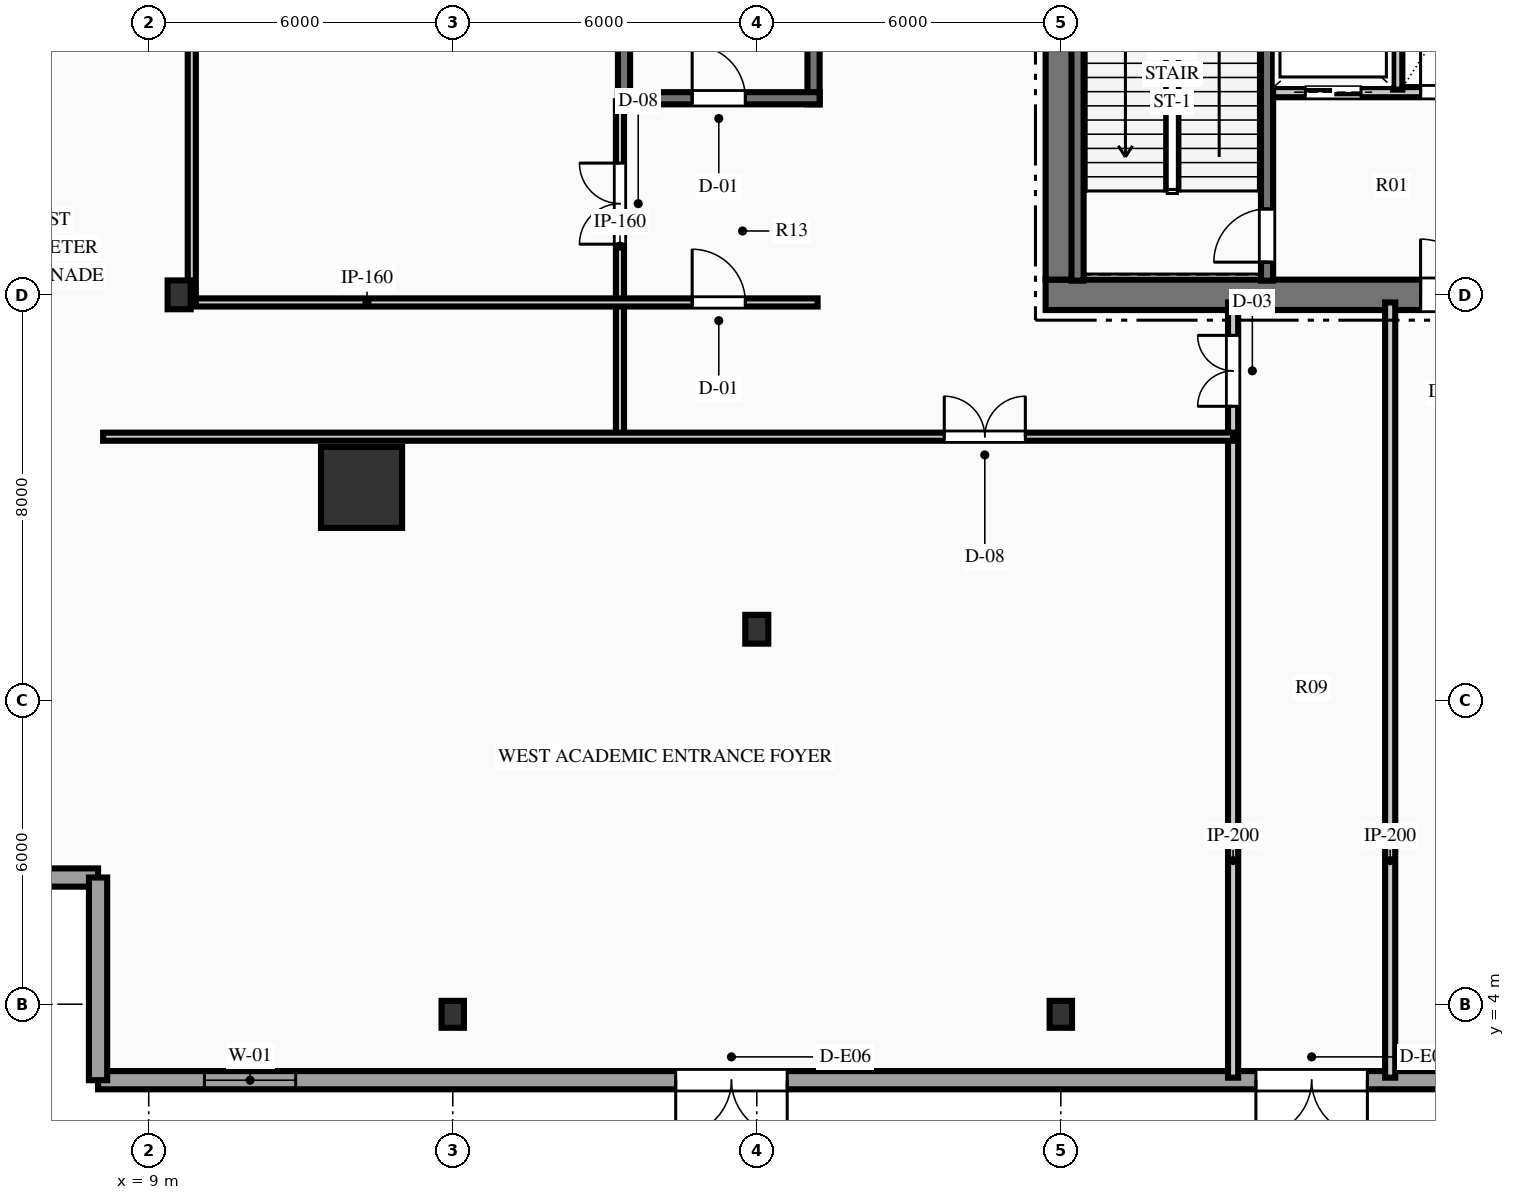
"""IFC4 building model, lengths in metres.
Left out: names, types, materials, properties, quantities, classifications, styles, units other than length and angle.
Written with IfcOpenShell. Run it as: python <this file> out.ifc"""

import sys

from ifc_helpers import new_model, si_unit, direction, frame, frame_2d, origin, origin_2d, place, context, subcontext, project, spatial, rectangle, hollow_rectangle, i_section, extrude, element, fill, save


model = new_model("IFC4")
c1 = context("Model", 3, precision=1e-05, world=origin(), true_north=direction((0.0, 1.0)))
c2 = subcontext(c1, "Body", "Model", "MODEL_VIEW")
j1 = project(units=[si_unit("LENGTHUNIT", "METRE"), si_unit("PLANEANGLEUNIT", "RADIAN")], contexts=[c1])
p1 = place(None, origin())
s1 = spatial("IfcSite", under=j1, at=p1, CompositionType="ELEMENT")
p2 = place(p1, origin())
s2 = spatial("IfcBuilding", under=s1, at=p2, CompositionType="ELEMENT")
p3 = place(p2, origin())
s3 = spatial("IfcBuildingStorey", under=s2, at=p3, CompositionType="ELEMENT", Elevation=0.0)
p4 = place(p3, frame((26.7, 18.0, 0.0), z_axis=(0.0, 0.0, 1.0), x_axis=(1.0, 0.0, 0.0)))
e1 = element("IfcWall", 1, at=p4, inside=s3, PredefinedType="SHEAR", context=c2, shape_type="SweptSolid", body=[
    extrude(rectangle(XDim=18.6, YDim=0.6, at=frame_2d((9.3, 0.0))), origin(), (0.0, 0.0, 1.0), 6.0),
])
p5 = place(p4, frame((7.4, 0.0, 0.0)))
e2 = element("IfcOpeningElement", 2, at=p5, cuts=e1, PredefinedType="OPENING", context=c2, shape_type="SweptSolid", body=[
    extrude(rectangle(XDim=1.1, YDim=2.15, at=frame_2d((0.55, 1.075))), frame((0.0, 0.31, 0.0), z_axis=(0.0, -1.0, 0.0), x_axis=(1.0, 0.0, 0.0)), (0.0, 0.0, 1.0), 0.62),
])
p6 = place(p4, frame((10.1, 0.0, 0.0)))
e3 = element("IfcOpeningElement", 3, at=p6, cuts=e1, PredefinedType="OPENING", context=c2, shape_type="SweptSolid", body=[
    extrude(rectangle(XDim=1.1, YDim=2.15, at=frame_2d((0.55, 1.075))), frame((0.0, 0.31, 0.0), z_axis=(0.0, -1.0, 0.0), x_axis=(1.0, 0.0, 0.0)), (0.0, 0.0, 1.0), 0.62),
])
p7 = place(p3, frame((27.0, 18.3, 0.0), z_axis=(0.0, 0.0, 1.0), x_axis=(0.0, 1.0, 0.0)))
e4 = element("IfcWall", 4, at=p7, inside=s3, PredefinedType="SHEAR", context=c2, shape_type="SweptSolid", body=[
    extrude(rectangle(XDim=15.4, YDim=0.6, at=frame_2d((7.7, 0.0))), origin(), (0.0, 0.0, 1.0), 6.0),
])
p8 = place(p7, frame((9.94, 0.0, 0.0)))
e5 = element("IfcOpeningElement", 5, at=p8, cuts=e4, PredefinedType="OPENING", context=c2, shape_type="SweptSolid", body=[
    extrude(rectangle(XDim=1.4, YDim=2.2, at=frame_2d((0.7, 1.1))), frame((0.0, 0.31, 0.0), z_axis=(0.0, -1.0, 0.0), x_axis=(1.0, 0.0, 0.0)), (0.0, 0.0, 1.0), 0.62),
])
p9 = place(p3, frame((31.07, 18.28, 0.0), z_axis=(0.0, 0.0, 1.0), x_axis=(0.0, 1.0, 0.0)))
e6 = element("IfcWall", 6, at=p9, inside=s3, PredefinedType="SHEAR", context=c2, shape_type="SweptSolid", body=[
    extrude(rectangle(XDim=8.26, YDim=0.24, at=frame_2d((4.13, 0.0))), origin(), (0.0, 0.0, 1.0), 6.0),
])
p10 = place(p9, frame((0.365, 0.0, 0.0)))
e7 = element("IfcOpeningElement", 7, at=p10, cuts=e6, PredefinedType="OPENING", context=c2, shape_type="SweptSolid", body=[
    extrude(rectangle(XDim=1.05, YDim=2.15, at=frame_2d((0.525, 1.075))), frame((0.0, 0.13, 0.0), z_axis=(0.0, -1.0, 0.0), x_axis=(1.0, 0.0, 0.0)), (0.0, 0.0, 1.0), 0.26),
])
p11 = place(p3, frame((27.33, 18.28, 0.0), z_axis=(0.0, 0.0, 1.0), x_axis=(0.0, 1.0, 0.0)))
e8 = element("IfcWall", 8, at=p11, inside=s3, PredefinedType="SHEAR", context=c2, shape_type="SweptSolid", body=[
    extrude(rectangle(XDim=8.26, YDim=0.24, at=frame_2d((4.13, 0.0))), origin(), (0.0, 0.0, 1.0), 6.0),
])
for number, where, z_axis, x_axis in (
    (9, (18.38, 21.76, 0.0), (0.0, 0.0, 1.0), (0.0, 1.0, 0.0)),
    (10, (22.12, 21.76, 0.0), (0.0, 0.0, 1.0), (0.0, 1.0, 0.0)),
):
    element("IfcWall", number, at=place(p3, frame(where, z_axis=z_axis, x_axis=x_axis)), inside=s3, PredefinedType="SHEAR", context=c2, shape_type="SweptSolid", body=[
        extrude(rectangle(XDim=8.38, YDim=0.24, at=frame_2d((4.19, 0.0))), origin(), (0.0, 0.0, 1.0), 6.0),
    ])
p12 = place(p3, frame((18.26, 21.88, 0.0), z_axis=(0.0, 0.0, 1.0), x_axis=(1.0, 0.0, 0.0)))
e11 = element("IfcWall", 11, at=p12, inside=s3, PredefinedType="SHEAR", context=c2, shape_type="SweptSolid", body=[
    extrude(rectangle(XDim=3.98, YDim=0.24, at=frame_2d((1.99, 0.0))), origin(), (0.0, 0.0, 1.0), 6.0),
])
p13 = place(p12, frame((1.465, 0.0, 0.0)))
e12 = element("IfcOpeningElement", 12, at=p13, cuts=e11, PredefinedType="OPENING", context=c2, shape_type="SweptSolid", body=[
    extrude(rectangle(XDim=1.05, YDim=2.15, at=frame_2d((0.525, 1.075))), frame((0.0, 0.13, 0.0), z_axis=(0.0, -1.0, 0.0), x_axis=(1.0, 0.0, 0.0)), (0.0, 0.0, 1.0), 0.26),
])
p14 = place(p3, frame((13.2, 14.2, 0.0), z_axis=(0.0, 0.0, 1.0), x_axis=(1.0, 0.0, 0.0)))
e13 = element("IfcColumn", 13, at=p14, inside=s3, PredefinedType="COLUMN", context=c2, shape_type="SweptSolid", body=[
    extrude(hollow_rectangle(XDim=1.6, YDim=1.6, WallThickness=0.08, at=origin_2d()), origin(), (0.0, 0.0, 1.0), 6.0),
])
for number, where, z_axis, x_axis in (
    (14, (9.6, 18.0, 0.0), (0.0, 0.0, 1.0), (1.0, 0.0, 0.0)),
    (15, (21.0, 11.4, 0.0), (0.0, 0.0, 1.0), (1.0, 0.0, 0.0)),
):
    element("IfcColumn", number, at=place(p3, frame(where, z_axis=z_axis, x_axis=x_axis)), inside=s3, PredefinedType="COLUMN", context=c2, shape_type="SweptSolid", body=[
        extrude(i_section(OverallWidth=0.454, OverallDepth=0.569, WebThickness=0.078, FlangeThickness=0.125, at=origin_2d()), origin(), (0.0, 0.0, 1.0), 6.0),
    ])
for number, where, z_axis, x_axis in (
    (16, (15.0, 3.8, 0.0), (0.0, 0.0, 1.0), (1.0, 0.0, 0.0)),
    (17, (27.0, 3.8, 0.0), (0.0, 0.0, 1.0), (1.0, 0.0, 0.0)),
):
    element("IfcColumn", number, at=place(p3, frame(where, z_axis=z_axis, x_axis=x_axis)), inside=s3, PredefinedType="PILASTER", context=c2, shape_type="SweptSolid", body=[
        extrude(i_section(OverallWidth=0.442, OverallDepth=0.531, WebThickness=0.066, FlangeThickness=0.106, at=origin_2d()), origin(), (0.0, 0.0, 1.0), 6.0),
    ])
p15 = place(p3, frame((64.0, 2.5, 0.0), z_axis=(0.0, 0.0, 1.0), x_axis=(-1.0, 0.0, 0.0)))
e18 = element("IfcWall", 18, at=p15, inside=s3, PredefinedType="STANDARD", context=c2, shape_type="SweptSolid", body=[
    extrude(rectangle(XDim=56.0, YDim=0.36, at=frame_2d((28.0, 0.0))), origin(), (0.0, 0.0, 1.0), 5.67),
])
p16 = place(p15, frame((30.95, 0.0, 0.0)))
e19 = element("IfcOpeningElement", 19, at=p16, cuts=e18, PredefinedType="OPENING", context=c2, shape_type="SweptSolid", body=[
    extrude(rectangle(XDim=2.2, YDim=2.4, at=frame_2d((1.1, 1.2))), frame((0.0, 0.19, 0.0), z_axis=(0.0, -1.0, 0.0), x_axis=(1.0, 0.0, 0.0)), (0.0, 0.0, 1.0), 0.38),
])
p17 = place(p15, frame((22.85, 0.0, 0.0)))
e20 = element("IfcOpeningElement", 20, at=p17, cuts=e18, PredefinedType="OPENING", context=c2, shape_type="SweptSolid", body=[
    extrude(rectangle(XDim=2.2, YDim=2.4, at=frame_2d((1.1, 1.2))), frame((0.0, 0.19, 0.0), z_axis=(0.0, -1.0, 0.0), x_axis=(1.0, 0.0, 0.0)), (0.0, 0.0, 1.0), 0.38),
])
p18 = place(p15, frame((42.4, 0.0, 0.0)))
e21 = element("IfcOpeningElement", 21, at=p18, cuts=e18, PredefinedType="OPENING", context=c2, shape_type="SweptSolid", body=[
    extrude(rectangle(XDim=2.2, YDim=2.4, at=frame_2d((1.1, 1.2))), frame((0.0, 0.19, 0.0), z_axis=(0.0, -1.0, 0.0), x_axis=(1.0, 0.0, 0.0)), (0.0, 0.0, 1.0), 0.38),
])
p19 = place(p15, frame((11.4, 0.0, 0.0)))
e22 = element("IfcOpeningElement", 22, at=p19, cuts=e18, PredefinedType="OPENING", context=c2, shape_type="SweptSolid", body=[
    extrude(rectangle(XDim=2.2, YDim=2.4, at=frame_2d((1.1, 1.2))), frame((0.0, 0.19, 0.0), z_axis=(0.0, -1.0, 0.0), x_axis=(1.0, 0.0, 0.0)), (0.0, 0.0, 1.0), 0.38),
])
p20 = place(p15, frame((26.8, 0.0, 0.0)))
e23 = element("IfcOpeningElement", 23, at=p20, cuts=e18, PredefinedType="OPENING", context=c2, shape_type="SweptSolid", body=[
    extrude(rectangle(XDim=2.4, YDim=2.6, at=frame_2d((1.2, 1.3))), frame((0.0, 0.19, 0.0), z_axis=(0.0, -1.0, 0.0), x_axis=(1.0, 0.0, 0.0)), (0.0, 0.0, 1.0), 0.38),
])
p21 = place(p15, frame((52.1, 0.0, 1.0)))
e24 = element("IfcOpeningElement", 24, at=p21, cuts=e18, PredefinedType="OPENING", context=c2, shape_type="SweptSolid", body=[
    extrude(rectangle(XDim=1.8, YDim=2.4, at=frame_2d((0.9, 1.2))), frame((0.0, 0.19, 0.0), z_axis=(0.0, -1.0, 0.0), x_axis=(1.0, 0.0, 0.0)), (0.0, 0.0, 1.0), 0.38),
])
p22 = place(p15, frame((2.1, 0.0, 1.0)))
e25 = element("IfcOpeningElement", 25, at=p22, cuts=e18, PredefinedType="OPENING", context=c2, shape_type="SweptSolid", body=[
    extrude(rectangle(XDim=1.8, YDim=2.4, at=frame_2d((0.9, 1.2))), frame((0.0, 0.19, 0.0), z_axis=(0.0, -1.0, 0.0), x_axis=(1.0, 0.0, 0.0)), (0.0, 0.0, 1.0), 0.38),
])
for number, where, z_axis, x_axis in (
    (26, (8.0, 6.5, 0.0), (0.0, 0.0, 1.0), (-1.0, 0.0, 0.0)),
    (27, (8.0, 2.5, 0.0), (0.0, 0.0, 1.0), (0.0, 1.0, 0.0)),
):
    element("IfcWall", number, at=place(p3, frame(where, z_axis=z_axis, x_axis=x_axis)), inside=s3, PredefinedType="STANDARD", context=c2, shape_type="SweptSolid", body=[
        extrude(rectangle(XDim=4.0, YDim=0.36, at=frame_2d((2.0, 0.0))), origin(), (0.0, 0.0, 1.0), 5.67),
    ])
p23 = place(p3, frame((31.19, 22.0, 0.0), z_axis=(0.0, 0.0, 1.0), x_axis=(1.0, 0.0, 0.0)))
e28 = element("IfcWall", 28, at=p23, inside=s3, PredefinedType="PARTITIONING", context=c2, shape_type="SweptSolid", body=[
    extrude(rectangle(XDim=4.69, YDim=0.2, at=frame_2d((2.345, 0.0))), origin(), (0.0, 0.0, 1.0), 5.67),
])
p24 = place(p23, frame((2.91, 0.0, 0.0)))
e29 = element("IfcOpeningElement", 29, at=p24, cuts=e28, PredefinedType="OPENING", context=c2, shape_type="SweptSolid", body=[
    extrude(rectangle(XDim=0.9, YDim=2.15, at=frame_2d((0.45, 1.075))), frame((0.0, 0.11, 0.0), z_axis=(0.0, -1.0, 0.0), x_axis=(1.0, 0.0, 0.0)), (0.0, 0.0, 1.0), 0.22),
])
p25 = place(p23, frame((0.635, 0.0, 0.0)))
e30 = element("IfcOpeningElement", 30, at=p25, cuts=e28, PredefinedType="OPENING", context=c2, shape_type="SweptSolid", body=[
    extrude(rectangle(XDim=1.1, YDim=2.15, at=frame_2d((0.55, 1.075))), frame((0.0, 0.11, 0.0), z_axis=(0.0, -1.0, 0.0), x_axis=(1.0, 0.0, 0.0)), (0.0, 0.0, 1.0), 0.22),
])
p26 = place(p3, frame((33.65, 22.05, 0.0), z_axis=(0.0, 0.0, 1.0), x_axis=(0.0, 1.0, 0.0)))
e31 = element("IfcWall", 31, at=p26, inside=s3, PredefinedType="PARTITIONING", context=c2, shape_type="SweptSolid", body=[
    extrude(rectangle(XDim=2.6, YDim=0.18, at=frame_2d((1.3, 0.0))), origin(), (0.0, 0.0, 1.0), 5.67),
])
p27 = place(p3, frame((30.4, 2.55, 0.0), z_axis=(0.0, 0.0, 1.0), x_axis=(0.0, 1.0, 0.0)))
e32 = element("IfcWall", 32, at=p27, inside=s3, PredefinedType="PARTITIONING", context=c2, shape_type="SweptSolid", body=[
    extrude(rectangle(XDim=15.3, YDim=0.2, at=frame_2d((7.65, 0.0))), origin(), (0.0, 0.0, 1.0), 5.67),
])
p28 = place(p27, frame((13.25, 0.0, 0.0)))
e33 = element("IfcOpeningElement", 33, at=p28, cuts=e32, PredefinedType="OPENING", context=c2, shape_type="SweptSolid", body=[
    extrude(rectangle(XDim=1.4, YDim=2.2, at=frame_2d((0.7, 1.1))), frame((0.0, 0.11, 0.0), z_axis=(0.0, -1.0, 0.0), x_axis=(1.0, 0.0, 0.0)), (0.0, 0.0, 1.0), 0.22),
])
p29 = place(p3, frame((33.5, 2.55, 0.0), z_axis=(0.0, 0.0, 1.0), x_axis=(0.0, 1.0, 0.0)))
e34 = element("IfcWall", 34, at=p29, inside=s3, PredefinedType="PARTITIONING", context=c2, shape_type="SweptSolid", body=[
    extrude(rectangle(XDim=15.3, YDim=0.2, at=frame_2d((7.65, 0.0))), origin(), (0.0, 0.0, 1.0), 5.67),
])
p30 = place(p3, frame((18.3, 15.2, 0.0), z_axis=(0.0, 0.0, 1.0), x_axis=(0.0, 1.0, 0.0)))
e35 = element("IfcWall", 35, at=p30, inside=s3, PredefinedType="PARTITIONING", context=c2, shape_type="SweptSolid", body=[
    extrude(rectangle(XDim=2.65, YDim=0.16, at=frame_2d((1.325, 0.0))), origin(), (0.0, 0.0, 1.0), 5.67),
])
p31 = place(p3, frame((18.3, 17.85, 0.0), z_axis=(0.0, 0.0, 1.0), x_axis=(0.0, 1.0, 0.0)))
e36 = element("IfcWall", 36, at=p31, inside=s3, PredefinedType="PARTITIONING", context=c2, shape_type="SweptSolid", body=[
    extrude(rectangle(XDim=3.97, YDim=0.16, at=frame_2d((1.985, 0.0))), origin(), (0.0, 0.0, 1.0), 5.67),
])
p32 = place(p31, frame((1.15, 0.0, 0.0)))
e37 = element("IfcOpeningElement", 37, at=p32, cuts=e36, PredefinedType="OPENING", context=c2, shape_type="SweptSolid", body=[
    extrude(rectangle(XDim=1.6, YDim=2.2, at=frame_2d((0.8, 1.1))), frame((0.0, 0.09, 0.0), z_axis=(0.0, -1.0, 0.0), x_axis=(1.0, 0.0, 0.0)), (0.0, 0.0, 1.0), 0.18),
])
p33 = place(p3, frame((9.85, 17.85, 0.0), z_axis=(0.0, 0.0, 1.0), x_axis=(1.0, 0.0, 0.0)))
e38 = element("IfcWall", 38, at=p33, inside=s3, PredefinedType="PARTITIONING", context=c2, shape_type="SweptSolid", body=[
    extrude(rectangle(XDim=12.35, YDim=0.16, at=frame_2d((6.175, 0.0))), origin(), (0.0, 0.0, 1.0), 4.803),
])
p34 = place(p33, frame((9.875, 0.0, 0.0)))
e39 = element("IfcOpeningElement", 39, at=p34, cuts=e38, PredefinedType="OPENING", context=c2, shape_type="SweptSolid", body=[
    extrude(rectangle(XDim=1.05, YDim=2.15, at=frame_2d((0.525, 1.075))), frame((0.0, 0.09, 0.0), z_axis=(0.0, -1.0, 0.0), x_axis=(1.0, 0.0, 0.0)), (0.0, 0.0, 1.0), 0.18),
])
p35 = place(p3, frame((9.85, 17.85, 0.0), z_axis=(0.0, 0.0, 1.0), x_axis=(0.0, 1.0, 0.0)))
e40 = element("IfcWall", 40, at=p35, inside=s3, PredefinedType="PARTITIONING", context=c2, shape_type="SweptSolid", body=[
    extrude(rectangle(XDim=16.3, YDim=0.16, at=frame_2d((8.15, 0.0))), origin(), (0.0, 0.0, 1.0), 4.803),
])
p36 = place(p35, frame((7.35, 0.0, 0.0)))
e41 = element("IfcOpeningElement", 41, at=p36, cuts=e40, PredefinedType="OPENING", context=c2, shape_type="SweptSolid", body=[
    extrude(rectangle(XDim=1.6, YDim=2.2, at=frame_2d((0.8, 1.1))), frame((0.0, 0.09, 0.0), z_axis=(0.0, -1.0, 0.0), x_axis=(1.0, 0.0, 0.0)), (0.0, 0.0, 1.0), 0.18),
])
p37 = place(p3, frame((8.1, 15.2, 0.0), z_axis=(0.0, 0.0, 1.0), x_axis=(1.0, 0.0, 0.0)))
e42 = element("IfcWall", 42, at=p37, inside=s3, PredefinedType="PARTITIONING", context=c2, shape_type="SweptSolid", body=[
    extrude(rectangle(XDim=22.3, YDim=0.16, at=frame_2d((11.15, 0.0))), origin(), (0.0, 0.0, 1.0), 4.803),
])
p38 = place(p37, frame((16.6, 0.0, 0.0)))
e43 = element("IfcOpeningElement", 43, at=p38, cuts=e42, PredefinedType="OPENING", context=c2, shape_type="SweptSolid", body=[
    extrude(rectangle(XDim=1.6, YDim=2.2, at=frame_2d((0.8, 1.1))), frame((0.0, 0.09, 0.0), z_axis=(0.0, -1.0, 0.0), x_axis=(1.0, 0.0, 0.0)), (0.0, 0.0, 1.0), 0.18),
])
p39 = place(p16, origin())
e44 = element("IfcDoor", 44, at=p39, inside=s3, OperationType="DOUBLE_DOOR_SINGLE_SWING", PredefinedType="DOOR", context=c2, shape_type="SweptSolid", body=[
    extrude(rectangle(XDim=2.2, YDim=2.4, at=frame_2d((1.1, 1.2))), frame((0.0, 0.025, 0.0), z_axis=(0.0, -1.0, 0.0), x_axis=(1.0, 0.0, 0.0)), (0.0, 0.0, 1.0), 0.05),
])
fill(e19, e44)
p40 = place(p18, origin())
e45 = element("IfcDoor", 45, at=p40, inside=s3, OperationType="DOUBLE_DOOR_SINGLE_SWING", PredefinedType="DOOR", context=c2, shape_type="SweptSolid", body=[
    extrude(rectangle(XDim=2.2, YDim=2.4, at=frame_2d((1.1, 1.2))), frame((0.0, 0.025, 0.0), z_axis=(0.0, -1.0, 0.0), x_axis=(1.0, 0.0, 0.0)), (0.0, 0.0, 1.0), 0.05),
])
fill(e21, e45)
p41 = place(p21, origin())
e46 = element("IfcWindow", 46, at=p41, inside=s3, PartitioningType="SINGLE_PANEL", PredefinedType="WINDOW", context=c2, shape_type="SweptSolid", body=[
    extrude(rectangle(XDim=1.8, YDim=2.4, at=frame_2d((0.9, 1.2))), frame((0.0, 0.03, 0.0), z_axis=(0.0, -1.0, 0.0), x_axis=(1.0, 0.0, 0.0)), (0.0, 0.0, 1.0), 0.06),
])
fill(e24, e46)
p42 = place(p10, origin())
e47 = element("IfcDoor", 47, at=p42, inside=s3, OperationType="SINGLE_SWING_LEFT", PredefinedType="DOOR", context=c2, shape_type="SweptSolid", body=[
    extrude(rectangle(XDim=1.05, YDim=2.15, at=frame_2d((0.525, 1.075))), frame((0.0, 0.025, 0.0), z_axis=(0.0, -1.0, 0.0), x_axis=(1.0, 0.0, 0.0)), (0.0, 0.0, 1.0), 0.05),
])
fill(e7, e47)
p43 = place(p5, origin())
e48 = element("IfcDoor", 48, at=p43, inside=s3, OperationType="SINGLE_SWING_LEFT", PredefinedType="DOOR", context=c2, shape_type="SweptSolid", body=[
    extrude(rectangle(XDim=1.1, YDim=2.15, at=frame_2d((0.55, 1.075))), frame((0.0, 0.025, 0.0), z_axis=(0.0, -1.0, 0.0), x_axis=(1.0, 0.0, 0.0)), (0.0, 0.0, 1.0), 0.05),
])
fill(e2, e48)
p44 = place(p24, origin())
e49 = element("IfcDoor", 49, at=p44, inside=s3, OperationType="SINGLE_SWING_LEFT", PredefinedType="DOOR", context=c2, shape_type="SweptSolid", body=[
    extrude(rectangle(XDim=0.9, YDim=2.15, at=frame_2d((0.45, 1.075))), frame((0.0, 0.025, 0.0), z_axis=(0.0, -1.0, 0.0), x_axis=(1.0, 0.0, 0.0)), (0.0, 0.0, 1.0), 0.05),
])
fill(e29, e49)
p45 = place(p13, origin())
e50 = element("IfcDoor", 50, at=p45, inside=s3, OperationType="SINGLE_SWING_LEFT", PredefinedType="DOOR", context=c2, shape_type="SweptSolid", body=[
    extrude(rectangle(XDim=1.05, YDim=2.15, at=frame_2d((0.525, 1.075))), frame((0.0, 0.025, 0.0), z_axis=(0.0, -1.0, 0.0), x_axis=(1.0, 0.0, 0.0)), (0.0, 0.0, 1.0), 0.05),
])
fill(e12, e50)
p46 = place(p34, origin())
e51 = element("IfcDoor", 51, at=p46, inside=s3, OperationType="SINGLE_SWING_LEFT", PredefinedType="DOOR", context=c2, shape_type="SweptSolid", body=[
    extrude(rectangle(XDim=1.05, YDim=2.15, at=frame_2d((0.525, 1.075))), frame((0.0, 0.025, 0.0), z_axis=(0.0, -1.0, 0.0), x_axis=(1.0, 0.0, 0.0)), (0.0, 0.0, 1.0), 0.05),
])
fill(e39, e51)
p47 = place(p28, origin())
e52 = element("IfcDoor", 52, at=p47, inside=s3, OperationType="DOUBLE_DOOR_SINGLE_SWING", PredefinedType="DOOR", context=c2, shape_type="SweptSolid", body=[
    extrude(rectangle(XDim=1.4, YDim=2.2, at=frame_2d((0.7, 1.1))), frame((0.0, 0.025, 0.0), z_axis=(0.0, -1.0, 0.0), x_axis=(1.0, 0.0, 0.0)), (0.0, 0.0, 1.0), 0.05),
])
fill(e33, e52)
p48 = place(p32, origin())
e53 = element("IfcDoor", 53, at=p48, inside=s3, OperationType="DOUBLE_DOOR_SINGLE_SWING", PredefinedType="DOOR", context=c2, shape_type="SweptSolid", body=[
    extrude(rectangle(XDim=1.6, YDim=2.2, at=frame_2d((0.8, 1.1))), frame((0.0, 0.025, 0.0), z_axis=(0.0, -1.0, 0.0), x_axis=(1.0, 0.0, 0.0)), (0.0, 0.0, 1.0), 0.05),
])
fill(e37, e53)
p49 = place(p38, origin())
e54 = element("IfcDoor", 54, at=p49, inside=s3, OperationType="DOUBLE_DOOR_SINGLE_SWING", PredefinedType="DOOR", context=c2, shape_type="SweptSolid", body=[
    extrude(rectangle(XDim=1.6, YDim=2.2, at=frame_2d((0.8, 1.1))), frame((0.0, 0.025, 0.0), z_axis=(0.0, -1.0, 0.0), x_axis=(1.0, 0.0, 0.0)), (0.0, 0.0, 1.0), 0.05),
])
fill(e43, e54)
p50 = place(p25, origin())
e55 = element("IfcDoor", 55, at=p50, inside=s3, OperationType="SLIDING_TO_LEFT", PredefinedType="DOOR", context=c2, shape_type="SweptSolid", body=[
    extrude(rectangle(XDim=1.1, YDim=2.15, at=frame_2d((0.55, 1.075))), frame((0.0, 0.025, 0.0), z_axis=(0.0, -1.0, 0.0), x_axis=(1.0, 0.0, 0.0)), (0.0, 0.0, 1.0), 0.05),
])
fill(e30, e55)
save(model, sys.argv[1])
